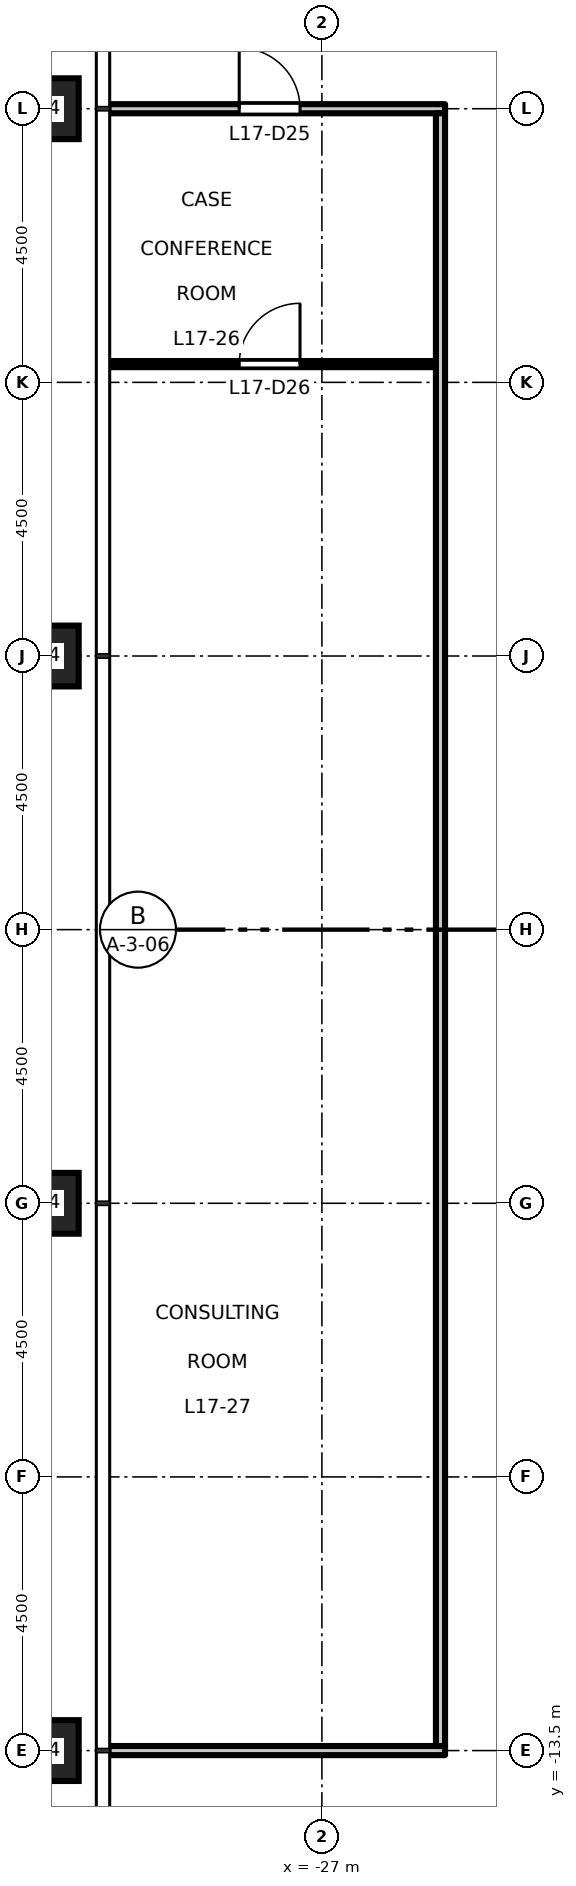
"""IFC4 building model, lengths in metres.
Left out: names, types, materials, properties, quantities, classifications, styles, units other than length and angle.
Written with IfcOpenShell. Run it as: python <this file> out.ifc"""

import sys

from ifc_helpers import new_model, si_unit, direction, frame, frame_2d, origin, origin_2d, place, context, subcontext, project, spatial, rectangle, hollow_rectangle, extrude, element, fill, save


model = new_model("IFC4")
c1 = context("Model", 3, precision=1e-05, world=origin(), true_north=direction((0.0, 1.0)))
c2 = subcontext(c1, "Body", "Model", "MODEL_VIEW")
j1 = project(units=[si_unit("LENGTHUNIT", "METRE"), si_unit("PLANEANGLEUNIT", "RADIAN")], contexts=[c1])
p1 = place(None, origin())
s1 = spatial("IfcSite", under=j1, at=p1, CompositionType="ELEMENT")
p2 = place(p1, origin())
s2 = spatial("IfcBuilding", under=s1, at=p2, CompositionType="ELEMENT")
p3 = place(p2, frame((0.0, 0.0, 80.7)))
s3 = spatial("IfcBuildingStorey", under=s2, at=p3, CompositionType="ELEMENT", Elevation=80.7)
for number, where, z_axis, x_axis in (
    (1, (-31.5, 13.5, 0.0), (0.0, 0.0, 1.0), (1.0, 0.0, 0.0)),
    (2, (-31.5, 4.5, 0.0), (0.0, 0.0, 1.0), (1.0, 0.0, 0.0)),
    (3, (-31.5, -4.5, 0.0), (0.0, 0.0, 1.0), (1.0, 0.0, 0.0)),
    (4, (-31.5, -13.5, 0.0), (0.0, 0.0, 1.0), (1.0, 0.0, 0.0)),
):
    element("IfcColumn", number, at=place(p3, frame(where, z_axis=z_axis, x_axis=x_axis)), inside=s3, PredefinedType="COLUMN", context=c2, shape_type="SweptSolid", body=[
        extrude(hollow_rectangle(XDim=1.0, YDim=1.0, WallThickness=0.06, at=origin_2d()), origin(), (0.0, 0.0, 1.0), 4.5),
    ])
p4 = place(p3, frame((-30.51, -13.5, 0.0), z_axis=(0.0, 0.0, 1.0), x_axis=(1.0, 0.0, 0.0)))
e5 = element("IfcWall", 5, at=p4, inside=s3, PredefinedType="PARTITIONING", context=c2, shape_type="SweptSolid", body=[
    extrude(rectangle(XDim=5.535, YDim=0.15, at=frame_2d((2.768, 0.0))), origin(), (0.0, 0.0, 1.0), 3.35),
])
p5 = place(p3, frame((-30.51, 9.3, 0.0), z_axis=(0.0, 0.0, 1.0), x_axis=(1.0, 0.0, 0.0)))
e6 = element("IfcWall", 6, at=p5, inside=s3, PredefinedType="PARTITIONING", context=c2, shape_type="SweptSolid", body=[
    extrude(rectangle(XDim=5.385, YDim=0.1, at=frame_2d((2.692, 0.0))), origin(), (0.0, 0.0, 1.0), 4.35),
])
p6 = place(p5, frame((2.15, 0.0, 0.0)))
e7 = element("IfcOpeningElement", 7, at=p6, cuts=e6, PredefinedType="OPENING", context=c2, shape_type="SweptSolid", body=[
    extrude(rectangle(XDim=1.0, YDim=2.1, at=frame_2d((0.5, 1.05))), frame((0.0, 0.06, 0.0), z_axis=(0.0, -1.0, 0.0), x_axis=(1.0, 0.0, 0.0)), (0.0, 0.0, 1.0), 0.12),
])
p7 = place(p3, frame((-30.51, 13.5, 0.0), z_axis=(0.0, 0.0, 1.0), x_axis=(1.0, 0.0, 0.0)))
e8 = element("IfcWall", 8, at=p7, inside=s3, PredefinedType="PARTITIONING", context=c2, shape_type="SweptSolid", body=[
    extrude(rectangle(XDim=5.535, YDim=0.15, at=frame_2d((2.768, 0.0))), origin(), (0.0, 0.0, 1.0), 3.35),
])
p8 = place(p7, frame((2.15, 0.0, 0.0)))
e9 = element("IfcOpeningElement", 9, at=p8, cuts=e8, PredefinedType="OPENING", context=c2, shape_type="SweptSolid", body=[
    extrude(rectangle(XDim=1.0, YDim=2.1, at=frame_2d((0.5, 1.05))), frame((0.0, 0.085, 0.0), z_axis=(0.0, -1.0, 0.0), x_axis=(1.0, 0.0, 0.0)), (0.0, 0.0, 1.0), 0.17),
])
p9 = place(p3, frame((-25.05, -13.425, 0.0), z_axis=(0.0, 0.0, 1.0), x_axis=(0.0, 1.0, 0.0)))
e10 = element("IfcWall", 10, at=p9, inside=s3, PredefinedType="PARTITIONING", context=c2, shape_type="SweptSolid", body=[
    extrude(rectangle(XDim=26.85, YDim=0.15, at=frame_2d((13.425, 0.0))), origin(), (0.0, 0.0, 1.0), 4.35),
])
p10 = place(p8, origin())
e11 = element("IfcDoor", 11, at=p10, inside=s3, OperationType="SINGLE_SWING_LEFT", PredefinedType="DOOR", context=c2, shape_type="SweptSolid", body=[
    extrude(rectangle(XDim=1.0, YDim=2.1, at=frame_2d((0.5, 1.05))), frame((0.0, 0.025, 0.0), z_axis=(0.0, -1.0, 0.0), x_axis=(1.0, 0.0, 0.0)), (0.0, 0.0, 1.0), 0.05),
])
fill(e9, e11)
p11 = place(p6, origin())
e12 = element("IfcDoor", 12, at=p11, inside=s3, OperationType="SINGLE_SWING_RIGHT", PredefinedType="DOOR", context=c2, shape_type="SweptSolid", body=[
    extrude(rectangle(XDim=1.0, YDim=2.1, at=frame_2d((0.5, 1.05))), frame((0.0, 0.025, 0.0), z_axis=(0.0, -1.0, 0.0), x_axis=(1.0, 0.0, 0.0)), (0.0, 0.0, 1.0), 0.05),
])
fill(e7, e12)
save(model, sys.argv[1])
